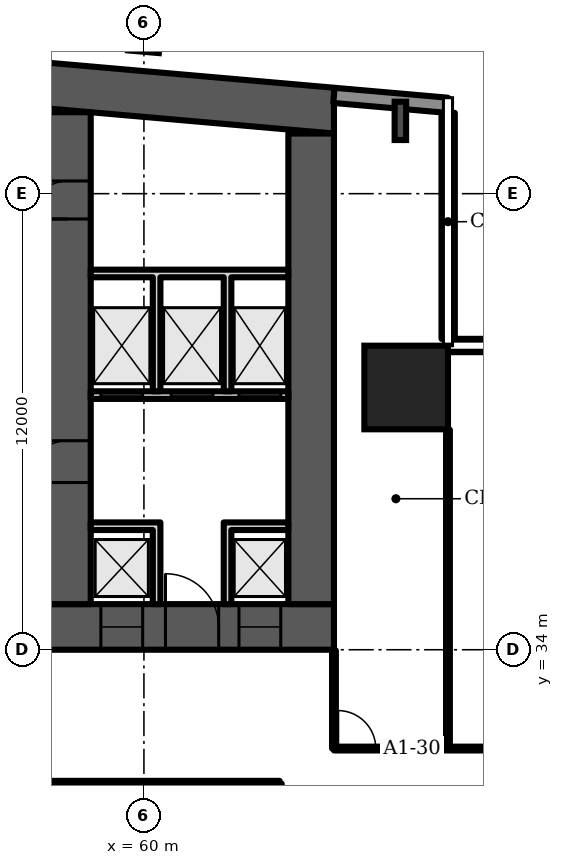
"""IFC4 building model, lengths in metres.
Left out: names, types, materials, properties, quantities, classifications, styles, units other than length and angle.
Written with IfcOpenShell. Run it as: python <this file> out.ifc"""

import sys

from ifc_helpers import new_model, si_unit, direction, frame, frame_2d, origin, origin_2d, place, context, subcontext, project, spatial, polyline, rectangle, i_section, outline, extrude, element, fill, save


model = new_model("IFC4")
c1 = context("Model", 3, precision=1e-05, world=origin(), true_north=direction((0.0, 1.0)))
c2 = subcontext(c1, "Body", "Model", "MODEL_VIEW")
j1 = project(units=[si_unit("LENGTHUNIT", "METRE"), si_unit("PLANEANGLEUNIT", "RADIAN")], contexts=[c1])
p1 = place(None, origin())
s1 = spatial("IfcSite", under=j1, at=p1, CompositionType="ELEMENT")
p2 = place(p1, origin())
s2 = spatial("IfcBuilding", under=s1, at=p2, CompositionType="ELEMENT")
p3 = place(p2, frame((0.0, 0.0, 41.5)))
s3 = spatial("IfcBuildingStorey", under=s2, at=p3, CompositionType="ELEMENT", Elevation=41.5)
p4 = place(p3, origin())
e1 = element("IfcWall", 1, at=p4, inside=s3, PredefinedType="SHEAR", context=c2, shape_type="SweptSolid", body=[
    extrude(outline(polyline([(9.0, 47.583), (37.0, 50.032), (65.0, 47.583), (65.0, 48.787), (37.0, 51.237), (9.0, 48.787), (9.0, 47.583)])), origin(), (0.0, 0.0, 1.0), 3.6),
])
p5 = place(p3, frame((9.0, 34.6, 0.0), z_axis=(0.0, 0.0, 1.0), x_axis=(1.0, 0.0, 0.0)))
e2 = element("IfcWall", 2, at=p5, inside=s3, PredefinedType="SHEAR", context=c2, shape_type="SweptSolid", body=[
    extrude(rectangle(XDim=56.0, YDim=1.2, at=frame_2d((28.0, 0.0))), origin(), (0.0, 0.0, 1.0), 3.6),
])
p6 = place(p5, frame((3.3, 0.0, 0.0)))
e3 = element("IfcOpeningElement", 3, at=p6, cuts=e2, PredefinedType="OPENING", context=c2, shape_type="SweptSolid", body=[
    extrude(rectangle(XDim=1.0, YDim=2.1, at=frame_2d((0.5, 1.05))), frame((0.0, 0.61, 0.0), z_axis=(0.0, -1.0, 0.0), x_axis=(1.0, 0.0, 0.0)), (0.0, 0.0, 1.0), 1.22),
])
p7 = place(p5, frame((7.867, 0.0, 0.0)))
e4 = element("IfcOpeningElement", 4, at=p7, cuts=e2, PredefinedType="OPENING", context=c2, shape_type="SweptSolid", body=[
    extrude(rectangle(XDim=1.1, YDim=2.1, at=frame_2d((0.55, 1.05))), frame((0.0, 0.61, 0.0), z_axis=(0.0, -1.0, 0.0), x_axis=(1.0, 0.0, 0.0)), (0.0, 0.0, 1.0), 1.22),
])
p8 = place(p5, frame((12.033, 0.0, 0.0)))
e5 = element("IfcOpeningElement", 5, at=p8, cuts=e2, PredefinedType="OPENING", context=c2, shape_type="SweptSolid", body=[
    extrude(rectangle(XDim=1.1, YDim=2.1, at=frame_2d((0.55, 1.05))), frame((0.0, 0.61, 0.0), z_axis=(0.0, -1.0, 0.0), x_axis=(1.0, 0.0, 0.0)), (0.0, 0.0, 1.0), 1.22),
])
p9 = place(p5, frame((9.8, 0.0, 0.0)))
e6 = element("IfcOpeningElement", 6, at=p9, cuts=e2, PredefinedType="OPENING", context=c2, shape_type="SweptSolid", body=[
    extrude(rectangle(XDim=1.4, YDim=2.1, at=frame_2d((0.7, 1.05))), frame((0.0, 0.61, 0.0), z_axis=(0.0, -1.0, 0.0), x_axis=(1.0, 0.0, 0.0)), (0.0, 0.0, 1.0), 1.22),
])
p10 = place(p5, frame((14.65, 0.0, 0.0)))
e7 = element("IfcOpeningElement", 7, at=p10, cuts=e2, PredefinedType="OPENING", context=c2, shape_type="SweptSolid", body=[
    extrude(rectangle(XDim=1.2, YDim=2.1, at=frame_2d((0.6, 1.05))), frame((0.0, 0.61, 0.0), z_axis=(0.0, -1.0, 0.0), x_axis=(1.0, 0.0, 0.0)), (0.0, 0.0, 1.0), 1.22),
])
p11 = place(p5, frame((21.867, 0.0, 0.0)))
e8 = element("IfcOpeningElement", 8, at=p11, cuts=e2, PredefinedType="OPENING", context=c2, shape_type="SweptSolid", body=[
    extrude(rectangle(XDim=1.1, YDim=2.1, at=frame_2d((0.55, 1.05))), frame((0.0, 0.61, 0.0), z_axis=(0.0, -1.0, 0.0), x_axis=(1.0, 0.0, 0.0)), (0.0, 0.0, 1.0), 1.22),
])
p12 = place(p5, frame((26.033, 0.0, 0.0)))
e9 = element("IfcOpeningElement", 9, at=p12, cuts=e2, PredefinedType="OPENING", context=c2, shape_type="SweptSolid", body=[
    extrude(rectangle(XDim=1.1, YDim=2.1, at=frame_2d((0.55, 1.05))), frame((0.0, 0.61, 0.0), z_axis=(0.0, -1.0, 0.0), x_axis=(1.0, 0.0, 0.0)), (0.0, 0.0, 1.0), 1.22),
])
p13 = place(p5, frame((23.8, 0.0, 0.0)))
e10 = element("IfcOpeningElement", 10, at=p13, cuts=e2, PredefinedType="OPENING", context=c2, shape_type="SweptSolid", body=[
    extrude(rectangle(XDim=1.4, YDim=2.1, at=frame_2d((0.7, 1.05))), frame((0.0, 0.61, 0.0), z_axis=(0.0, -1.0, 0.0), x_axis=(1.0, 0.0, 0.0)), (0.0, 0.0, 1.0), 1.22),
])
p14 = place(p5, frame((28.867, 0.0, 0.0)))
e11 = element("IfcOpeningElement", 11, at=p14, cuts=e2, PredefinedType="OPENING", context=c2, shape_type="SweptSolid", body=[
    extrude(rectangle(XDim=1.1, YDim=2.1, at=frame_2d((0.55, 1.05))), frame((0.0, 0.61, 0.0), z_axis=(0.0, -1.0, 0.0), x_axis=(1.0, 0.0, 0.0)), (0.0, 0.0, 1.0), 1.22),
])
p15 = place(p5, frame((33.033, 0.0, 0.0)))
e12 = element("IfcOpeningElement", 12, at=p15, cuts=e2, PredefinedType="OPENING", context=c2, shape_type="SweptSolid", body=[
    extrude(rectangle(XDim=1.1, YDim=2.1, at=frame_2d((0.55, 1.05))), frame((0.0, 0.61, 0.0), z_axis=(0.0, -1.0, 0.0), x_axis=(1.0, 0.0, 0.0)), (0.0, 0.0, 1.0), 1.22),
])
p16 = place(p5, frame((40.15, 0.0, 0.0)))
e13 = element("IfcOpeningElement", 13, at=p16, cuts=e2, PredefinedType="OPENING", context=c2, shape_type="SweptSolid", body=[
    extrude(rectangle(XDim=1.2, YDim=2.1, at=frame_2d((0.6, 1.05))), frame((0.0, 0.61, 0.0), z_axis=(0.0, -1.0, 0.0), x_axis=(1.0, 0.0, 0.0)), (0.0, 0.0, 1.0), 1.22),
])
p17 = place(p5, frame((44.8, 0.0, 0.0)))
e14 = element("IfcOpeningElement", 14, at=p17, cuts=e2, PredefinedType="OPENING", context=c2, shape_type="SweptSolid", body=[
    extrude(rectangle(XDim=1.4, YDim=2.1, at=frame_2d((0.7, 1.05))), frame((0.0, 0.61, 0.0), z_axis=(0.0, -1.0, 0.0), x_axis=(1.0, 0.0, 0.0)), (0.0, 0.0, 1.0), 1.22),
])
p18 = place(p5, frame((49.867, 0.0, 0.0)))
e15 = element("IfcOpeningElement", 15, at=p18, cuts=e2, PredefinedType="OPENING", context=c2, shape_type="SweptSolid", body=[
    extrude(rectangle(XDim=1.1, YDim=2.1, at=frame_2d((0.55, 1.05))), frame((0.0, 0.61, 0.0), z_axis=(0.0, -1.0, 0.0), x_axis=(1.0, 0.0, 0.0)), (0.0, 0.0, 1.0), 1.22),
])
p19 = place(p5, frame((53.5, 0.0, 0.0)))
e16 = element("IfcOpeningElement", 16, at=p19, cuts=e2, PredefinedType="OPENING", context=c2, shape_type="SweptSolid", body=[
    extrude(rectangle(XDim=1.1, YDim=2.1, at=frame_2d((0.55, 1.05))), frame((0.0, 0.61, 0.0), z_axis=(0.0, -1.0, 0.0), x_axis=(1.0, 0.0, 0.0)), (0.0, 0.0, 1.0), 1.22),
])
p20 = place(p5, frame((51.567, 0.0, 0.0)))
e17 = element("IfcOpeningElement", 17, at=p20, cuts=e2, PredefinedType="OPENING", context=c2, shape_type="SweptSolid", body=[
    extrude(rectangle(XDim=1.4, YDim=2.1, at=frame_2d((0.7, 1.05))), frame((0.0, 0.61, 0.0), z_axis=(0.0, -1.0, 0.0), x_axis=(1.0, 0.0, 0.0)), (0.0, 0.0, 1.0), 1.22),
])
p21 = place(p3, frame((58.0, 35.2, 0.0), z_axis=(0.0, 0.0, 1.0), x_axis=(0.0, 1.0, 0.0)))
e18 = element("IfcWall", 18, at=p21, inside=s3, PredefinedType="SHEAR", context=c2, shape_type="SweptSolid", body=[
    extrude(rectangle(XDim=12.943, YDim=1.2, at=frame_2d((6.471, 0.0))), origin(), (0.0, 0.0, 1.0), 3.6),
])
p22 = place(p21, frame((10.134, 0.0, 0.0)))
e19 = element("IfcOpeningElement", 19, at=p22, cuts=e18, PredefinedType="OPENING", context=c2, shape_type="SweptSolid", body=[
    extrude(rectangle(XDim=1.0, YDim=2.1, at=frame_2d((0.5, 1.05))), frame((0.0, 0.61, 0.0), z_axis=(0.0, -1.0, 0.0), x_axis=(1.0, 0.0, 0.0)), (0.0, 0.0, 1.0), 1.22),
])
p23 = place(p21, frame((3.2, 0.0, 0.0)))
e20 = element("IfcOpeningElement", 20, at=p23, cuts=e18, PredefinedType="OPENING", context=c2, shape_type="SweptSolid", body=[
    extrude(rectangle(XDim=1.1, YDim=2.1, at=frame_2d((0.55, 1.05))), frame((0.0, 0.61, 0.0), z_axis=(0.0, -1.0, 0.0), x_axis=(1.0, 0.0, 0.0)), (0.0, 0.0, 1.0), 1.22),
])
p24 = place(p3, frame((64.4, 35.2, 0.0), z_axis=(0.0, 0.0, 1.0), x_axis=(0.0, 1.0, 0.0)))
e21 = element("IfcWall", 21, at=p24, inside=s3, PredefinedType="SHEAR", context=c2, shape_type="SweptSolid", body=[
    extrude(rectangle(XDim=12.383, YDim=1.2, at=frame_2d((6.191, 0.0))), origin(), (0.0, 0.0, 1.0), 3.6),
])
p25 = place(p3, frame((66.9, 40.9, 0.0), z_axis=(0.0, 0.0, 1.0), x_axis=(1.0, 0.0, 0.0)))
e22 = element("IfcColumn", 22, at=p25, inside=s3, PredefinedType="COLUMN", context=c2, shape_type="SweptSolid", body=[
    extrude(rectangle(XDim=2.2, YDim=2.2, at=origin_2d()), origin(), (0.0, 0.0, 1.0), 3.6),
])
p26 = place(p3, frame((66.748, 47.915, 0.0), z_axis=(0.0, 0.0, 1.0), x_axis=(1.0, 0.0, 0.0)))
e23 = element("IfcColumn", 23, at=p26, inside=s3, PredefinedType="COLUMN", context=c2, shape_type="SweptSolid", body=[
    extrude(i_section(OverallWidth=0.302, OverallDepth=1.008, WebThickness=0.021, FlangeThickness=0.04, FilletRadius=0.03, at=origin_2d()), origin(), (0.0, 0.0, 1.0), 3.6),
])
p27 = place(p3, frame((60.0, 49.885, 0.0), z_axis=(0.0, 0.0, 1.0), x_axis=(0.087156, 0.996197, 0.0)))
e24 = element("IfcColumn", 24, at=p27, inside=s3, PredefinedType="COLUMN", context=c2, shape_type="SweptSolid", body=[
    extrude(i_section(OverallWidth=0.303, OverallDepth=0.814, WebThickness=0.021, FlangeThickness=0.04, FilletRadius=0.03, at=origin_2d()), origin(), (0.0, 0.0, 1.0), 3.6),
])
p28 = place(p3, frame((67.983, 48.326, 0.0), z_axis=(0.0, 0.0, 1.0), x_axis=(-0.996194, 0.087168, 0.0)))
e25 = element("IfcWall", 25, at=p28, inside=s3, PredefinedType="SOLIDWALL", context=c2, shape_type="SweptSolid", body=[
    extrude(rectangle(XDim=2.994, YDim=0.4, at=frame_2d((1.497, 0.0))), origin(), (0.0, 0.0, 1.0), 3.2),
])
p29 = place(p3, frame((76.047, 42.005, 0.0), z_axis=(0.0, 0.0, 1.0), x_axis=(-1.0, 0.0, 0.0)))
e26 = element("IfcWall", 26, at=p29, inside=s3, PredefinedType="SOLIDWALL", context=c2, shape_type="SweptSolid", body=[
    extrude(rectangle(XDim=8.047, YDim=0.35, at=frame_2d((4.023, 0.0))), origin(), (0.0, 0.0, 1.0), 1.0),
])
p30 = place(p3, frame((68.005, 42.18, 0.0), z_axis=(0.0, 0.0, 1.0), x_axis=(0.0, 1.0, 0.0)))
e27 = element("IfcWall", 27, at=p30, inside=s3, PredefinedType="SOLIDWALL", context=c2, shape_type="SweptSolid", body=[
    extrude(rectangle(XDim=5.947, YDim=0.35, at=frame_2d((2.973, 0.0))), origin(), (0.0, 0.0, 1.0), 1.0),
])
p31 = place(p3, frame((58.6, 40.7, 0.0), z_axis=(0.0, 0.0, 1.0), x_axis=(1.0, 0.0, 0.0)))
e28 = element("IfcWall", 28, at=p31, inside=s3, PredefinedType="PARTITIONING", context=c2, shape_type="SweptSolid", body=[
    extrude(rectangle(XDim=5.2, YDim=0.2, at=frame_2d((2.6, 0.0))), origin(), (0.0, 0.0, 1.0), 3.2),
])
p32 = place(p31, frame((0.267, 0.0, 0.0)))
e29 = element("IfcOpeningElement", 29, at=p32, cuts=e28, PredefinedType="OPENING", context=c2, shape_type="SweptSolid", body=[
    extrude(rectangle(XDim=1.1, YDim=2.1, at=frame_2d((0.55, 1.05))), frame((0.0, 0.11, 0.0), z_axis=(0.0, -1.0, 0.0), x_axis=(1.0, 0.0, 0.0)), (0.0, 0.0, 1.0), 0.22),
])
p33 = place(p31, frame((2.117, 0.0, 0.0)))
e30 = element("IfcOpeningElement", 30, at=p33, cuts=e28, PredefinedType="OPENING", context=c2, shape_type="SweptSolid", body=[
    extrude(rectangle(XDim=1.1, YDim=2.1, at=frame_2d((0.55, 1.05))), frame((0.0, 0.11, 0.0), z_axis=(0.0, -1.0, 0.0), x_axis=(1.0, 0.0, 0.0)), (0.0, 0.0, 1.0), 0.22),
])
p34 = place(p31, frame((3.9, 0.0, 0.0)))
e31 = element("IfcOpeningElement", 31, at=p34, cuts=e28, PredefinedType="OPENING", context=c2, shape_type="SweptSolid", body=[
    extrude(rectangle(XDim=1.1, YDim=2.1, at=frame_2d((0.55, 1.05))), frame((0.0, 0.11, 0.0), z_axis=(0.0, -1.0, 0.0), x_axis=(1.0, 0.0, 0.0)), (0.0, 0.0, 1.0), 0.22),
])
p35 = place(p3, frame((0.0, 0.0, -0.0)))
e32 = element("IfcWall", 32, at=p35, inside=s3, PredefinedType="PARTITIONING", context=c2, shape_type="SweptSolid", body=[
    extrude(outline(polyline([(60.233, 37.15), (58.6, 37.15), (58.6, 37.35), (60.233, 37.35), (60.433, 37.35), (60.433, 35.2), (60.233, 35.2), (60.233, 37.15)])), origin(), (0.0, 0.0, 1.0), 3.2),
])
p36 = place(p3, frame((0.0, 0.0, -0.0)))
e33 = element("IfcWall", 33, at=p36, inside=s3, PredefinedType="PARTITIONING", context=c2, shape_type="SweptSolid", body=[
    extrude(outline(polyline([(62.1, 37.35), (62.3, 37.35), (63.8, 37.35), (63.8, 37.15), (62.3, 37.15), (62.3, 35.2), (62.1, 35.2), (62.1, 37.35)])), origin(), (0.0, 0.0, 1.0), 3.2),
])
p37 = place(p3, frame((0.0, 0.0, -0.0)))
e34 = element("IfcWall", 34, at=p37, inside=s3, PredefinedType="PARTITIONING", context=c2, shape_type="SweptSolid", body=[
    extrude(outline(polyline([(60.433, 40.8), (60.233, 40.8), (60.233, 43.8), (58.6, 43.8), (58.6, 44.0), (63.8, 44.0), (63.8, 43.8), (62.3, 43.8), (62.3, 40.8), (62.1, 40.8), (62.1, 43.8), (60.433, 43.8), (60.433, 40.8)])), origin(), (0.0, 0.0, 1.0), 3.2),
])
p38 = place(p3, frame((57.67, 14.24, 0.0), z_axis=(0.0, 0.0, 1.0), x_axis=(0.0, 1.0, 0.0)))
e35 = element("IfcWall", 35, at=p38, inside=s3, PredefinedType="PARTITIONING", context=c2, shape_type="SweptSolid", body=[
    extrude(rectangle(XDim=16.26, YDim=0.1, at=frame_2d((8.13, 0.0))), origin(), (0.0, 0.0, 1.0), 3.2),
])
p39 = place(p3, frame((63.57, 14.245, 0.0), z_axis=(0.0, 0.0, 1.0), x_axis=(0.000331, 1.000002, 0.0)))
e36 = element("IfcWall", 36, at=p39, inside=s3, PredefinedType="PARTITIONING", context=c2, shape_type="SweptSolid", body=[
    extrude(rectangle(XDim=16.233, YDim=0.1, at=frame_2d((8.117, 0.0))), origin(), (0.0, 0.0, 1.0), 3.2),
])
p40 = place(p3, frame((65.0, 31.4, 0.0), z_axis=(0.0, 0.0, 1.0), x_axis=(0.0, 1.0, 0.0)))
e37 = element("IfcWall", 37, at=p40, inside=s3, PredefinedType="PARTITIONING", context=c2, shape_type="SweptSolid", body=[
    extrude(rectangle(XDim=2.58, YDim=0.1, at=frame_2d((1.29, 0.0))), origin(), (0.0, 0.0, 1.0), 3.2),
])
p41 = place(p3, frame((65.0, 31.4, 0.0), z_axis=(0.0, 0.0, 1.0), x_axis=(1.0, 0.0, 0.0)))
e38 = element("IfcWall", 38, at=p41, inside=s3, PredefinedType="PARTITIONING", context=c2, shape_type="SweptSolid", body=[
    extrude(rectangle(XDim=7.125, YDim=0.1, at=frame_2d((3.562, 0.0))), origin(), (0.0, 0.0, 1.0), 3.2),
])
p42 = place(p41, frame((0.1, 0.0, 0.0)))
e39 = element("IfcOpeningElement", 39, at=p42, cuts=e38, PredefinedType="OPENING", context=c2, shape_type="SweptSolid", body=[
    extrude(rectangle(XDim=1.0, YDim=2.1, at=frame_2d((0.5, 1.05))), frame((0.0, 0.06, 0.0), z_axis=(0.0, -1.0, 0.0), x_axis=(1.0, 0.0, 0.0)), (0.0, 0.0, 1.0), 0.12),
])
p43 = place(p41, frame((5.625, 0.0, 0.0)))
e40 = element("IfcOpeningElement", 40, at=p43, cuts=e38, PredefinedType="OPENING", context=c2, shape_type="SweptSolid", body=[
    extrude(rectangle(XDim=1.0, YDim=2.1, at=frame_2d((0.5, 1.05))), frame((0.0, 0.06, 0.0), z_axis=(0.0, -1.0, 0.0), x_axis=(1.0, 0.0, 0.0)), (0.0, 0.0, 1.0), 0.12),
])
p44 = place(p3, frame((68.0, 31.4, 0.0), z_axis=(0.0, 0.0, 1.0), x_axis=(0.0, 1.0, 0.0)))
e41 = element("IfcWall", 41, at=p44, inside=s3, PredefinedType="PARTITIONING", context=c2, shape_type="SweptSolid", body=[
    extrude(rectangle(XDim=8.39, YDim=0.1, at=frame_2d((4.195, 0.0))), origin(), (0.0, 0.0, 1.0), 3.2),
])
p45 = place(p3, frame((44.15, 30.5, 0.0), z_axis=(0.0, 0.0, 1.0), x_axis=(1.0, 0.0, 0.0)))
e42 = element("IfcWall", 42, at=p45, inside=s3, PredefinedType="PARTITIONING", context=c2, shape_type="SweptSolid", body=[
    extrude(rectangle(XDim=19.42, YDim=0.1, at=frame_2d((9.71, 0.0))), origin(), (0.0, 0.0, 1.0), 3.2),
])
p46 = place(p45, frame((15.54, 0.0, 0.0)))
e43 = element("IfcOpeningElement", 43, at=p46, cuts=e42, PredefinedType="OPENING", context=c2, shape_type="SweptSolid", body=[
    extrude(rectangle(XDim=1.0, YDim=2.1, at=frame_2d((0.5, 1.05))), frame((0.0, 0.06, 0.0), z_axis=(0.0, -1.0, 0.0), x_axis=(1.0, 0.0, 0.0)), (0.0, 0.0, 1.0), 0.12),
])
p47 = place(p18, origin())
e44 = element("IfcDoor", 44, at=p47, inside=s3, OperationType="DOUBLE_DOOR_SLIDING", PredefinedType="DOOR", context=c2, shape_type="SweptSolid", body=[
    extrude(rectangle(XDim=1.1, YDim=2.1, at=frame_2d((0.55, 1.05))), frame((0.0, 0.025, 0.0), z_axis=(0.0, -1.0, 0.0), x_axis=(1.0, 0.0, 0.0)), (0.0, 0.0, 1.0), 0.05),
])
fill(e15, e44)
p48 = place(p19, origin())
e45 = element("IfcDoor", 45, at=p48, inside=s3, OperationType="DOUBLE_DOOR_SLIDING", PredefinedType="DOOR", context=c2, shape_type="SweptSolid", body=[
    extrude(rectangle(XDim=1.1, YDim=2.1, at=frame_2d((0.55, 1.05))), frame((0.0, 0.025, 0.0), z_axis=(0.0, -1.0, 0.0), x_axis=(1.0, 0.0, 0.0)), (0.0, 0.0, 1.0), 0.05),
])
fill(e16, e45)
p49 = place(p20, origin())
e46 = element("IfcDoor", 46, at=p49, inside=s3, OperationType="DOUBLE_DOOR_SINGLE_SWING", PredefinedType="DOOR", context=c2, shape_type="SweptSolid", body=[
    extrude(rectangle(XDim=1.4, YDim=2.1, at=frame_2d((0.7, 1.05))), frame((0.0, 0.025, 0.0), z_axis=(0.0, -1.0, 0.0), x_axis=(1.0, 0.0, 0.0)), (0.0, 0.0, 1.0), 0.05),
])
fill(e17, e46)
p50 = place(p32, origin())
e47 = element("IfcDoor", 47, at=p50, inside=s3, OperationType="DOUBLE_DOOR_SLIDING", PredefinedType="DOOR", context=c2, shape_type="SweptSolid", body=[
    extrude(rectangle(XDim=1.1, YDim=2.1, at=frame_2d((0.55, 1.05))), frame((0.0, 0.025, 0.0), z_axis=(0.0, -1.0, 0.0), x_axis=(1.0, 0.0, 0.0)), (0.0, 0.0, 1.0), 0.05),
])
fill(e29, e47)
p51 = place(p33, origin())
e48 = element("IfcDoor", 48, at=p51, inside=s3, OperationType="DOUBLE_DOOR_SLIDING", PredefinedType="DOOR", context=c2, shape_type="SweptSolid", body=[
    extrude(rectangle(XDim=1.1, YDim=2.1, at=frame_2d((0.55, 1.05))), frame((0.0, 0.025, 0.0), z_axis=(0.0, -1.0, 0.0), x_axis=(1.0, 0.0, 0.0)), (0.0, 0.0, 1.0), 0.05),
])
fill(e30, e48)
p52 = place(p34, origin())
e49 = element("IfcDoor", 49, at=p52, inside=s3, OperationType="DOUBLE_DOOR_SLIDING", PredefinedType="DOOR", context=c2, shape_type="SweptSolid", body=[
    extrude(rectangle(XDim=1.1, YDim=2.1, at=frame_2d((0.55, 1.05))), frame((0.0, 0.025, 0.0), z_axis=(0.0, -1.0, 0.0), x_axis=(1.0, 0.0, 0.0)), (0.0, 0.0, 1.0), 0.05),
])
fill(e31, e49)
p53 = place(p22, origin())
e50 = element("IfcDoor", 50, at=p53, inside=s3, OperationType="SINGLE_SWING_LEFT", PredefinedType="DOOR", context=c2, shape_type="SweptSolid", body=[
    extrude(rectangle(XDim=1.0, YDim=2.1, at=frame_2d((0.5, 1.05))), frame((0.0, 0.6, 0.0), z_axis=(0.0, -1.0, 0.0), x_axis=(1.0, 0.0, 0.0)), (0.0, 0.0, 1.0), 1.199),
])
fill(e19, e50)
p54 = place(p23, origin())
e51 = element("IfcDoor", 51, at=p54, inside=s3, OperationType="SINGLE_SWING_LEFT", PredefinedType="DOOR", context=c2, shape_type="SweptSolid", body=[
    extrude(rectangle(XDim=1.1, YDim=2.1, at=frame_2d((0.55, 1.05))), frame((0.0, 0.025, 0.0), z_axis=(0.0, -1.0, 0.0), x_axis=(1.0, 0.0, 0.0)), (0.0, 0.0, 1.0), 0.05),
])
fill(e20, e51)
p55 = place(p46, origin())
e52 = element("IfcDoor", 52, at=p55, inside=s3, OperationType="SINGLE_SWING_RIGHT", PredefinedType="DOOR", context=c2, shape_type="SweptSolid", body=[
    extrude(rectangle(XDim=1.0, YDim=2.1, at=frame_2d((0.5, 1.05))), frame((0.0, 0.025, 0.0), z_axis=(0.0, -1.0, 0.0), x_axis=(1.0, 0.0, 0.0)), (0.0, 0.0, 1.0), 0.05),
])
fill(e43, e52)
p56 = place(p42, origin())
e53 = element("IfcDoor", 53, at=p56, inside=s3, OperationType="SINGLE_SWING_LEFT", PredefinedType="DOOR", context=c2, shape_type="SweptSolid", body=[
    extrude(rectangle(XDim=1.0, YDim=2.1, at=frame_2d((0.5, 1.05))), frame((0.0, 0.025, 0.0), z_axis=(0.0, -1.0, 0.0), x_axis=(1.0, 0.0, 0.0)), (0.0, 0.0, 1.0), 0.05),
])
fill(e39, e53)
save(model, sys.argv[1])
